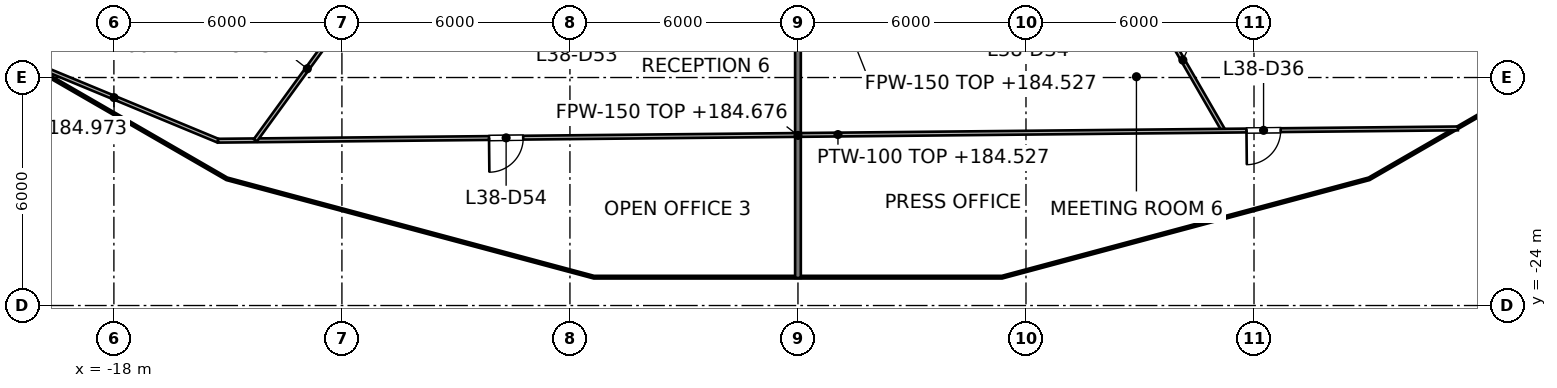
"""IFC4 building model, lengths in metres.
Left out: names, types, materials, properties, quantities, classifications, styles, units other than length and angle.
Written with IfcOpenShell. Run it as: python <this file> out.ifc"""

import sys

from ifc_helpers import new_model, si_unit, direction, frame, frame_2d, origin, place, context, subcontext, project, spatial, rectangle, extrude, element, fill, save


model = new_model("IFC4")
c1 = context("Model", 3, precision=1e-05, world=origin(), true_north=direction((0.0, 1.0)))
c2 = subcontext(c1, "Body", "Model", "MODEL_VIEW")
j1 = project(units=[si_unit("LENGTHUNIT", "METRE"), si_unit("PLANEANGLEUNIT", "RADIAN")], contexts=[c1])
p1 = place(None, origin())
s1 = spatial("IfcSite", under=j1, at=p1, CompositionType="ELEMENT")
p2 = place(p1, origin())
s2 = spatial("IfcBuilding", under=s1, at=p2, CompositionType="ELEMENT")
p3 = place(p2, frame((0.0, 0.0, 181.6)))
s3 = spatial("IfcBuildingStorey", under=s2, at=p3, CompositionType="ELEMENT", Elevation=181.6)
p4 = place(p3, frame((0.0, -23.274, 0.0), z_axis=(0.0, 0.0, 1.0), x_axis=(0.0, 1.0, 0.0)))
e1 = element("IfcWall", 1, at=p4, inside=s3, PredefinedType="PARTITIONING", context=c2, shape_type="SweptSolid", body=[
    extrude(rectangle(XDim=7.502, YDim=0.15, at=frame_2d((3.751, 0.0))), origin(), (0.0, 0.0, 1.0), 3.076),
])
p5 = place(p3, frame((9.054, -15.682, 0.0), z_axis=(0.0, 0.0, 1.0), x_axis=(0.499966883342, -0.866044522851, 0.0)))
e2 = element("IfcWall", 2, at=p5, inside=s3, PredefinedType="PARTITIONING", context=c2, shape_type="SweptSolid", body=[
    extrude(rectangle(XDim=4.294, YDim=0.1, at=frame_2d((2.147, 0.0))), origin(), (0.0, 0.0, 1.0), 3.85),
])
p6 = place(p3, frame((-20.732, -17.395, 0.0), z_axis=(0.0, 0.0, 1.0), x_axis=(0.923788700377, -0.382902646968, 0.0)))
e3 = element("IfcWall", 3, at=p6, inside=s3, PredefinedType="PARTITIONING", context=c2, shape_type="SweptSolid", body=[
    extrude(rectangle(XDim=5.923, YDim=0.1, at=frame_2d((2.962, 0.0))), origin(), (0.0, 0.0, 1.0), 3.373),
])
p7 = place(p3, frame((-15.26, -19.663, 0.0), z_axis=(0.0, 0.0, 1.0), x_axis=(0.999950698652, 0.009929766651, 0.0)))
e4 = element("IfcWall", 4, at=p7, inside=s3, PredefinedType="PARTITIONING", context=c2, shape_type="SweptSolid", body=[
    extrude(rectangle(XDim=32.627, YDim=0.1, at=frame_2d((16.313, 0.0))), origin(), (0.0, 0.0, 1.0), 2.927),
])
p8 = place(p7, frame((27.063, 0.0, 0.0)))
e5 = element("IfcOpeningElement", 5, at=p8, cuts=e4, PredefinedType="OPENING", context=c2, shape_type="SweptSolid", body=[
    extrude(rectangle(XDim=0.9, YDim=2.1, at=frame_2d((0.45, 1.05))), frame((0.0, 0.05, 0.0), z_axis=(0.0, -1.0, 0.0), x_axis=(1.0, 0.0, 0.0)), (0.0, 0.0, 1.0), 0.1),
])
p9 = place(p7, frame((7.131, 0.0, 0.0)))
e6 = element("IfcOpeningElement", 6, at=p9, cuts=e4, PredefinedType="OPENING", context=c2, shape_type="SweptSolid", body=[
    extrude(rectangle(XDim=0.9, YDim=2.1, at=frame_2d((0.45, 1.05))), frame((0.0, 0.05, 0.0), z_axis=(0.0, -1.0, 0.0), x_axis=(1.0, 0.0, 0.0)), (0.0, 0.0, 1.0), 0.1),
])
p10 = place(p3, frame((-14.279, -19.653, 0.0), z_axis=(0.0, 0.0, 1.0), x_axis=(0.587800653116, 0.809005804797, 0.0)))
e7 = element("IfcWall", 7, at=p10, inside=s3, PredefinedType="PARTITIONING", context=c2, shape_type="SweptSolid", body=[
    extrude(rectangle(XDim=4.656, YDim=0.1, at=frame_2d((2.328, 0.0))), origin(), (0.0, 0.0, 1.0), 2.927),
])
p11 = place(p8, origin())
e8 = element("IfcDoor", 8, at=p11, inside=s3, OperationType="SINGLE_SWING_LEFT", PredefinedType="DOOR", context=c2, shape_type="SweptSolid", body=[
    extrude(rectangle(XDim=0.9, YDim=2.1, at=frame_2d((0.45, 1.05))), frame((0.0, 0.025, 0.0), z_axis=(0.0, -1.0, 0.0), x_axis=(1.0, 0.0, 0.0)), (0.0, 0.0, 1.0), 0.05),
])
fill(e5, e8)
p12 = place(p9, origin())
e9 = element("IfcDoor", 9, at=p12, inside=s3, OperationType="SINGLE_SWING_LEFT", PredefinedType="DOOR", context=c2, shape_type="SweptSolid", body=[
    extrude(rectangle(XDim=0.9, YDim=2.1, at=frame_2d((0.45, 1.05))), frame((0.0, 0.025, 0.0), z_axis=(0.0, -1.0, 0.0), x_axis=(1.0, 0.0, 0.0)), (0.0, 0.0, 1.0), 0.05),
])
fill(e6, e9)
save(model, sys.argv[1])
